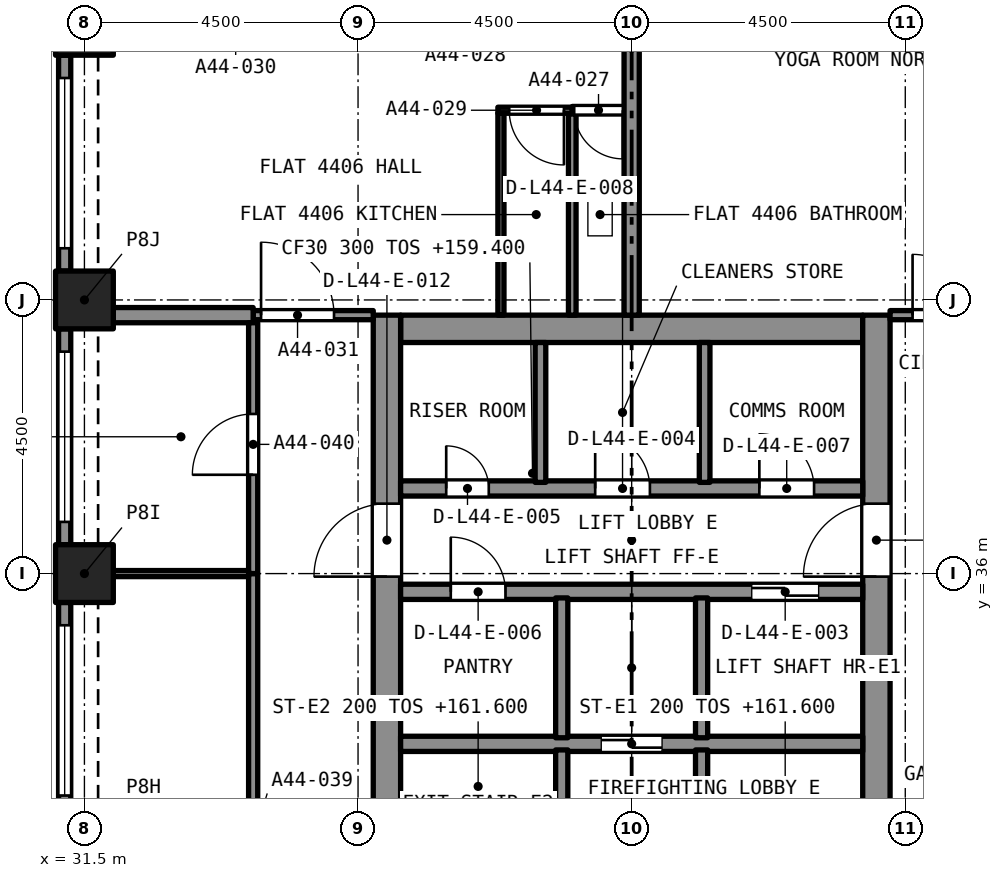
"""IFC4 building model, lengths in metres.
Left out: names, types, materials, properties, quantities, classifications, styles, units other than length and angle.
Written with IfcOpenShell. Run it as: python <this file> out.ifc"""

import sys

from ifc_helpers import new_model, si_unit, direction, frame, frame_2d, origin, origin_2d, place, context, subcontext, project, spatial, rectangle, extrude, element, fill, save


model = new_model("IFC4")
c1 = context("Model", 3, precision=1e-05, world=origin(), true_north=direction((0.0, 1.0)))
c2 = subcontext(c1, "Body", "Model", "MODEL_VIEW")
j1 = project(units=[si_unit("LENGTHUNIT", "METRE"), si_unit("PLANEANGLEUNIT", "RADIAN")], contexts=[c1])
p1 = place(None, origin())
s1 = spatial("IfcSite", under=j1, at=p1, CompositionType="ELEMENT")
p2 = place(p1, origin())
s2 = spatial("IfcBuilding", under=s1, at=p2, CompositionType="ELEMENT")
p3 = place(p2, frame((0.0, 0.0, 159.4)))
s3 = spatial("IfcBuildingStorey", under=s2, at=p3, CompositionType="ELEMENT", Elevation=159.4)
for number, where, z_axis, x_axis in (
    (1, (31.5, 36.0, 0.0), (0.0, 0.0, 1.0), (1.0, 0.0, 0.0)),
    (2, (31.5, 40.5, 0.0), (0.0, 0.0, 1.0), (1.0, 0.0, 0.0)),
    (3, (31.5, 45.0, 0.0), (0.0, 0.0, 1.0), (1.0, 0.0, 0.0)),
):
    element("IfcColumn", number, at=place(p3, frame(where, z_axis=z_axis, x_axis=x_axis)), inside=s3, PredefinedType="COLUMN", context=c2, shape_type="SweptSolid", body=[
        extrude(rectangle(XDim=0.95, YDim=0.95, at=origin_2d()), origin(), (0.0, 0.0, 1.0), 4.4),
    ])
p4 = place(p3, frame((36.7, 40.025, 0.0), z_axis=(0.0, 0.0, 1.0), x_axis=(1.0, 0.0, 0.0)))
e4 = element("IfcWall", 4, at=p4, inside=s3, PredefinedType="SOLIDWALL", context=c2, shape_type="SweptSolid", body=[
    extrude(rectangle(XDim=7.6, YDim=0.45, at=frame_2d((3.8, 0.0))), origin(), (0.0, 0.0, 1.0), 4.4),
])
p5 = place(p3, frame((36.475, 27.25, 0.0), z_axis=(0.0, 0.0, 1.0), x_axis=(0.0, 1.0, 0.0)))
e5 = element("IfcWall", 5, at=p5, inside=s3, PredefinedType="SOLIDWALL", context=c2, shape_type="SweptSolid", body=[
    extrude(rectangle(XDim=13.0, YDim=0.45, at=frame_2d((6.5, 0.0))), origin(), (0.0, 0.0, 1.0), 4.4),
])
p6 = place(p5, frame((8.7, 0.0, 0.0)))
e6 = element("IfcOpeningElement", 6, at=p6, cuts=e5, PredefinedType="OPENING", context=c2, shape_type="SweptSolid", body=[
    extrude(rectangle(XDim=1.2, YDim=2.1, at=frame_2d((0.6, 1.05))), frame((0.0, 0.235, 0.0), z_axis=(0.0, -1.0, 0.0), x_axis=(1.0, 0.0, 0.0)), (0.0, 0.0, 1.0), 0.47),
])
p7 = place(p3, frame((44.525, 27.25, 0.0), z_axis=(0.0, 0.0, 1.0), x_axis=(0.0, 1.0, 0.0)))
e7 = element("IfcWall", 7, at=p7, inside=s3, PredefinedType="SOLIDWALL", context=c2, shape_type="SweptSolid", body=[
    extrude(rectangle(XDim=13.0, YDim=0.45, at=frame_2d((6.5, 0.0))), origin(), (0.0, 0.0, 1.0), 4.4),
])
p8 = place(p7, frame((8.7, 0.0, 0.0)))
e8 = element("IfcOpeningElement", 8, at=p8, cuts=e7, PredefinedType="OPENING", context=c2, shape_type="SweptSolid", body=[
    extrude(rectangle(XDim=1.2, YDim=2.1, at=frame_2d((0.6, 1.05))), frame((0.0, 0.235, 0.0), z_axis=(0.0, -1.0, 0.0), x_axis=(1.0, 0.0, 0.0)), (0.0, 0.0, 1.0), 0.47),
])
p9 = place(p3, frame((31.175, 40.975, 0.0), z_axis=(0.0, 0.0, 1.0), x_axis=(0.0, 1.0, 0.0)))
e9 = element("IfcWall", 9, at=p9, inside=s3, PredefinedType="SOLIDWALL", context=c2, shape_type="SweptSolid", body=[
    extrude(rectangle(XDim=3.55, YDim=0.2, at=frame_2d((1.775, 0.0))), origin(), (0.0, 0.0, 1.0), 4.4),
])
p10 = place(p9, frame((0.375, 0.0, 0.45)))
e10 = element("IfcOpeningElement", 10, at=p10, cuts=e9, PredefinedType="OPENING", context=c2, shape_type="SweptSolid", body=[
    extrude(rectangle(XDim=2.8, YDim=2.55, at=frame_2d((1.4, 1.275))), frame((0.0, 0.11, 0.0), z_axis=(0.0, -1.0, 0.0), x_axis=(1.0, 0.0, 0.0)), (0.0, 0.0, 1.0), 0.22),
])
p11 = place(p3, frame((31.175, 36.475, 0.0), z_axis=(0.0, 0.0, 1.0), x_axis=(0.0, 1.0, 0.0)))
e11 = element("IfcWall", 11, at=p11, inside=s3, PredefinedType="SOLIDWALL", context=c2, shape_type="SweptSolid", body=[
    extrude(rectangle(XDim=3.55, YDim=0.2, at=frame_2d((1.775, 0.0))), origin(), (0.0, 0.0, 1.0), 4.4),
])
p12 = place(p11, frame((0.375, 0.0, 0.45)))
e12 = element("IfcOpeningElement", 12, at=p12, cuts=e11, PredefinedType="OPENING", context=c2, shape_type="SweptSolid", body=[
    extrude(rectangle(XDim=2.8, YDim=2.55, at=frame_2d((1.4, 1.275))), frame((0.0, 0.11, 0.0), z_axis=(0.0, -1.0, 0.0), x_axis=(1.0, 0.0, 0.0)), (0.0, 0.0, 1.0), 0.22),
])
p13 = place(p3, frame((31.175, 31.975, 0.0), z_axis=(0.0, 0.0, 1.0), x_axis=(0.0, 1.0, 0.0)))
e13 = element("IfcWall", 13, at=p13, inside=s3, PredefinedType="SOLIDWALL", context=c2, shape_type="SweptSolid", body=[
    extrude(rectangle(XDim=3.55, YDim=0.2, at=frame_2d((1.775, 0.0))), origin(), (0.0, 0.0, 1.0), 4.4),
])
p14 = place(p13, frame((0.375, 0.0, 0.45)))
e14 = element("IfcOpeningElement", 14, at=p14, cuts=e13, PredefinedType="OPENING", context=c2, shape_type="SweptSolid", body=[
    extrude(rectangle(XDim=2.8, YDim=2.55, at=frame_2d((1.4, 1.275))), frame((0.0, 0.11, 0.0), z_axis=(0.0, -1.0, 0.0), x_axis=(1.0, 0.0, 0.0)), (0.0, 0.0, 1.0), 0.22),
])
p15 = place(p3, frame((40.375, 43.62, 0.0), z_axis=(0.0, 0.0, 1.0), x_axis=(-1.0, 0.0, 0.0)))
e15 = element("IfcWall", 15, at=p15, inside=s3, PredefinedType="PARTITIONING", context=c2, shape_type="SweptSolid", body=[
    extrude(rectangle(XDim=0.852, YDim=0.125, at=frame_2d((0.426, 0.0))), origin(), (0.0, 0.0, 1.0), 4.1),
])
p16 = place(p15, frame((0.02, 0.0, 0.0)))
e16 = element("IfcOpeningElement", 16, at=p16, cuts=e15, PredefinedType="OPENING", context=c2, shape_type="SweptSolid", body=[
    extrude(rectangle(XDim=0.8, YDim=2.1, at=frame_2d((0.4, 1.05))), frame((0.0, 0.073, 0.0), z_axis=(0.0, -1.0, 0.0), x_axis=(1.0, 0.0, 0.0)), (0.0, 0.0, 1.0), 0.145),
])
p17 = place(p3, frame((39.523, 40.25, 0.0), z_axis=(0.0, 0.0, 1.0), x_axis=(0.0, 1.0, 0.0)))
e17 = element("IfcWall", 17, at=p17, inside=s3, PredefinedType="PARTITIONING", context=c2, shape_type="SweptSolid", body=[
    extrude(rectangle(XDim=3.308, YDim=0.125, at=frame_2d((1.654, 0.0))), origin(), (0.0, 0.0, 1.0), 4.1),
])
p18 = place(p3, frame((40.5, 40.25, 0.0), z_axis=(0.0, 0.0, 1.0), x_axis=(0.0, 1.0, 0.0)))
e18 = element("IfcWall", 18, at=p18, inside=s3, PredefinedType="PARTITIONING", context=c2, shape_type="SweptSolid", body=[
    extrude(rectangle(XDim=8.775, YDim=0.25, at=frame_2d((4.387, 0.0))), origin(), (0.0, 0.0, 1.0), 4.1),
])
p19 = place(p3, frame((39.523, 43.62, 0.0), z_axis=(0.0, 0.0, 1.0), x_axis=(-1.0, 0.0, 0.0)))
e19 = element("IfcWall", 19, at=p19, inside=s3, PredefinedType="PARTITIONING", context=c2, shape_type="SweptSolid", body=[
    extrude(rectangle(XDim=1.223, YDim=0.1, at=frame_2d((0.611, 0.0))), origin(), (0.0, 0.0, 1.0), 4.1),
])
p20 = place(p19, frame((0.136, 0.0, 0.0)))
e20 = element("IfcOpeningElement", 20, at=p20, cuts=e19, PredefinedType="OPENING", context=c2, shape_type="SweptSolid", body=[
    extrude(rectangle(XDim=0.9, YDim=2.1, at=frame_2d((0.45, 1.05))), frame((0.0, 0.06, 0.0), z_axis=(0.0, -1.0, 0.0), x_axis=(1.0, 0.0, 0.0)), (0.0, 0.0, 1.0), 0.12),
])
p21 = place(p3, frame((38.35, 40.25, 0.0), z_axis=(0.0, 0.0, 1.0), x_axis=(0.0, 1.0, 0.0)))
e21 = element("IfcWall", 21, at=p21, inside=s3, PredefinedType="PARTITIONING", context=c2, shape_type="SweptSolid", body=[
    extrude(rectangle(XDim=3.32, YDim=0.1, at=frame_2d((1.66, 0.0))), origin(), (0.0, 0.0, 1.0), 4.1),
])
p22 = place(p3, frame((34.275, 40.25, 0.0), z_axis=(0.0, 0.0, 1.0), x_axis=(1.0, 0.0, 0.0)))
e22 = element("IfcWall", 22, at=p22, inside=s3, PredefinedType="PARTITIONING", context=c2, shape_type="SweptSolid", body=[
    extrude(rectangle(XDim=1.975, YDim=0.15, at=frame_2d((0.988, 0.0))), origin(), (0.0, 0.0, 1.0), 4.1),
])
p23 = place(p22, frame((0.13, 0.0, 0.0)))
e23 = element("IfcOpeningElement", 23, at=p23, cuts=e22, PredefinedType="OPENING", context=c2, shape_type="SweptSolid", body=[
    extrude(rectangle(XDim=1.2, YDim=2.4, at=frame_2d((0.6, 1.2))), frame((0.0, 0.085, 0.0), z_axis=(0.0, -1.0, 0.0), x_axis=(1.0, 0.0, 0.0)), (0.0, 0.0, 1.0), 0.17),
])
p24 = place(p3, frame((31.975, 40.25, 0.0), z_axis=(0.0, 0.0, 1.0), x_axis=(1.0, 0.0, 0.0)))
e24 = element("IfcWall", 24, at=p24, inside=s3, PredefinedType="PARTITIONING", context=c2, shape_type="SweptSolid", body=[
    extrude(rectangle(XDim=2.3, YDim=0.25, at=frame_2d((1.15, 0.0))), origin(), (0.0, 0.0, 1.0), 4.1),
])
p25 = place(p3, frame((44.75, 40.25, 0.0), z_axis=(0.0, 0.0, 1.0), x_axis=(1.0, 0.0, 0.0)))
e25 = element("IfcWall", 25, at=p25, inside=s3, PredefinedType="PARTITIONING", context=c2, shape_type="SweptSolid", body=[
    extrude(rectangle(XDim=1.5, YDim=0.15, at=frame_2d((0.75, 0.0))), origin(), (0.0, 0.0, 1.0), 4.1),
])
p26 = place(p25, frame((0.37, 0.0, 0.0)))
e26 = element("IfcOpeningElement", 26, at=p26, cuts=e25, PredefinedType="OPENING", context=c2, shape_type="SweptSolid", body=[
    extrude(rectangle(XDim=1.0, YDim=2.1, at=frame_2d((0.5, 1.05))), frame((0.0, 0.085, 0.0), z_axis=(0.0, -1.0, 0.0), x_axis=(1.0, 0.0, 0.0)), (0.0, 0.0, 1.0), 0.17),
])
p27 = place(p3, frame((34.275, 27.175, 0.0), z_axis=(0.0, 0.0, 1.0), x_axis=(0.0, 1.0, 0.0)))
e27 = element("IfcWall", 27, at=p27, inside=s3, PredefinedType="PARTITIONING", context=c2, shape_type="SweptSolid", body=[
    extrude(rectangle(XDim=8.825, YDim=0.15, at=frame_2d((4.413, 0.0))), origin(), (0.0, 0.0, 1.0), 4.1),
])
p28 = place(p27, frame((3.95, 0.0, 0.0)))
e28 = element("IfcOpeningElement", 28, at=p28, cuts=e27, PredefinedType="OPENING", context=c2, shape_type="SweptSolid", body=[
    extrude(rectangle(XDim=1.0, YDim=2.1, at=frame_2d((0.5, 1.05))), frame((0.0, 0.085, 0.0), z_axis=(0.0, -1.0, 0.0), x_axis=(1.0, 0.0, 0.0)), (0.0, 0.0, 1.0), 0.17),
])
p29 = place(p3, frame((34.275, 36.0, 0.0), z_axis=(0.0, 0.0, 1.0), x_axis=(0.0, 1.0, 0.0)))
e29 = element("IfcWall", 29, at=p29, inside=s3, PredefinedType="PARTITIONING", context=c2, shape_type="SweptSolid", body=[
    extrude(rectangle(XDim=4.125, YDim=0.15, at=frame_2d((2.062, 0.0))), origin(), (0.0, 0.0, 1.0), 4.1),
])
p30 = place(p29, frame((1.625, 0.0, 0.0)))
e30 = element("IfcOpeningElement", 30, at=p30, cuts=e29, PredefinedType="OPENING", context=c2, shape_type="SweptSolid", body=[
    extrude(rectangle(XDim=1.0, YDim=2.1, at=frame_2d((0.5, 1.05))), frame((0.0, 0.085, 0.0), z_axis=(0.0, -1.0, 0.0), x_axis=(1.0, 0.0, 0.0)), (0.0, 0.0, 1.0), 0.17),
])
p31 = place(p3, frame((31.975, 36.0, 0.0), z_axis=(0.0, 0.0, 1.0), x_axis=(1.0, 0.0, 0.0)))
e31 = element("IfcWall", 31, at=p31, inside=s3, PredefinedType="PARTITIONING", context=c2, shape_type="SweptSolid", body=[
    extrude(rectangle(XDim=2.225, YDim=0.1, at=frame_2d((1.112, 0.0))), origin(), (0.0, 0.0, 1.0), 4.1),
])
p32 = place(p3, frame((36.7, 33.2, 0.0), z_axis=(0.0, 0.0, 1.0), x_axis=(1.0, 0.0, 0.0)))
e32 = element("IfcWall", 32, at=p32, inside=s3, PredefinedType="SOLIDWALL", context=c2, shape_type="SweptSolid", body=[
    extrude(rectangle(XDim=7.6, YDim=0.25, at=frame_2d((3.8, 0.0))), origin(), (0.0, 0.0, 1.0), 4.1),
])
p33 = place(p32, frame((3.3, 0.0, 0.0)))
e33 = element("IfcOpeningElement", 33, at=p33, cuts=e32, PredefinedType="OPENING", context=c2, shape_type="SweptSolid", body=[
    extrude(rectangle(XDim=1.0, YDim=2.1, at=frame_2d((0.5, 1.05))), frame((0.0, 0.135, 0.0), z_axis=(0.0, -1.0, 0.0), x_axis=(1.0, 0.0, 0.0)), (0.0, 0.0, 1.0), 0.27),
])
p34 = place(p3, frame((36.7, 35.7, 0.0), z_axis=(0.0, 0.0, 1.0), x_axis=(1.0, 0.0, 0.0)))
e34 = element("IfcWall", 34, at=p34, inside=s3, PredefinedType="SOLIDWALL", context=c2, shape_type="SweptSolid", body=[
    extrude(rectangle(XDim=7.6, YDim=0.25, at=frame_2d((3.8, 0.0))), origin(), (0.0, 0.0, 1.0), 4.1),
])
p35 = place(p34, frame((5.775, 0.0, 0.0)))
e35 = element("IfcOpeningElement", 35, at=p35, cuts=e34, PredefinedType="OPENING", context=c2, shape_type="SweptSolid", body=[
    extrude(rectangle(XDim=1.1, YDim=2.4, at=frame_2d((0.55, 1.2))), frame((0.0, 0.135, 0.0), z_axis=(0.0, -1.0, 0.0), x_axis=(1.0, 0.0, 0.0)), (0.0, 0.0, 1.0), 0.27),
])
p36 = place(p34, frame((0.825, 0.0, 0.0)))
e36 = element("IfcOpeningElement", 36, at=p36, cuts=e34, PredefinedType="OPENING", context=c2, shape_type="SweptSolid", body=[
    extrude(rectangle(XDim=0.9, YDim=2.1, at=frame_2d((0.45, 1.05))), frame((0.0, 0.135, 0.0), z_axis=(0.0, -1.0, 0.0), x_axis=(1.0, 0.0, 0.0)), (0.0, 0.0, 1.0), 0.27),
])
p37 = place(p3, frame((36.7, 37.4, 0.0), z_axis=(0.0, 0.0, 1.0), x_axis=(1.0, 0.0, 0.0)))
e37 = element("IfcWall", 37, at=p37, inside=s3, PredefinedType="SOLIDWALL", context=c2, shape_type="SweptSolid", body=[
    extrude(rectangle(XDim=7.6, YDim=0.25, at=frame_2d((3.8, 0.0))), origin(), (0.0, 0.0, 1.0), 4.1),
])
p38 = place(p37, frame((0.75, 0.0, 0.0)))
e38 = element("IfcOpeningElement", 38, at=p38, cuts=e37, PredefinedType="OPENING", context=c2, shape_type="SweptSolid", body=[
    extrude(rectangle(XDim=0.7, YDim=2.1, at=frame_2d((0.35, 1.05))), frame((0.0, 0.135, 0.0), z_axis=(0.0, -1.0, 0.0), x_axis=(1.0, 0.0, 0.0)), (0.0, 0.0, 1.0), 0.27),
])
p39 = place(p37, frame((5.9, 0.0, 0.0)))
e39 = element("IfcOpeningElement", 39, at=p39, cuts=e37, PredefinedType="OPENING", context=c2, shape_type="SweptSolid", body=[
    extrude(rectangle(XDim=0.9, YDim=2.1, at=frame_2d((0.45, 1.05))), frame((0.0, 0.135, 0.0), z_axis=(0.0, -1.0, 0.0), x_axis=(1.0, 0.0, 0.0)), (0.0, 0.0, 1.0), 0.27),
])
p40 = place(p37, frame((3.2, 0.0, 0.0)))
e40 = element("IfcOpeningElement", 40, at=p40, cuts=e37, PredefinedType="OPENING", context=c2, shape_type="SweptSolid", body=[
    extrude(rectangle(XDim=0.9, YDim=2.1, at=frame_2d((0.45, 1.05))), frame((0.0, 0.135, 0.0), z_axis=(0.0, -1.0, 0.0), x_axis=(1.0, 0.0, 0.0)), (0.0, 0.0, 1.0), 0.27),
])
p41 = place(p3, frame((41.65, 27.7, 0.0), z_axis=(0.0, 0.0, 1.0), x_axis=(0.0, 1.0, 0.0)))
e41 = element("IfcWall", 41, at=p41, inside=s3, PredefinedType="SOLIDWALL", context=c2, shape_type="SweptSolid", body=[
    extrude(rectangle(XDim=5.4, YDim=0.2, at=frame_2d((2.7, 0.0))), origin(), (0.0, 0.0, 1.0), 4.1),
])
p42 = place(p41, frame((0.2, 0.0, 0.0)))
e42 = element("IfcOpeningElement", 42, at=p42, cuts=e41, PredefinedType="OPENING", context=c2, shape_type="SweptSolid", body=[
    extrude(rectangle(XDim=0.9, YDim=2.1, at=frame_2d((0.45, 1.05))), frame((0.0, 0.11, 0.0), z_axis=(0.0, -1.0, 0.0), x_axis=(1.0, 0.0, 0.0)), (0.0, 0.0, 1.0), 0.22),
])
p43 = place(p3, frame((39.35, 27.7, 0.0), z_axis=(0.0, 0.0, 1.0), x_axis=(0.0, 1.0, 0.0)))
e43 = element("IfcWall", 43, at=p43, inside=s3, PredefinedType="SOLIDWALL", context=c2, shape_type="SweptSolid", body=[
    extrude(rectangle(XDim=5.4, YDim=0.2, at=frame_2d((2.7, 0.0))), origin(), (0.0, 0.0, 1.0), 4.1),
])
p44 = place(p43, frame((0.2, 0.0, 0.0)))
e44 = element("IfcOpeningElement", 44, at=p44, cuts=e43, PredefinedType="OPENING", context=c2, shape_type="SweptSolid", body=[
    extrude(rectangle(XDim=0.9, YDim=2.1, at=frame_2d((0.45, 1.05))), frame((0.0, 0.11, 0.0), z_axis=(0.0, -1.0, 0.0), x_axis=(1.0, 0.0, 0.0)), (0.0, 0.0, 1.0), 0.22),
])
for number, where, z_axis, x_axis in (
    (45, (41.65, 33.3, 0.0), (0.0, 0.0, 1.0), (0.0, 1.0, 0.0)),
    (46, (39.35, 33.3, 0.0), (0.0, 0.0, 1.0), (0.0, 1.0, 0.0)),
):
    element("IfcWall", number, at=place(p3, frame(where, z_axis=z_axis, x_axis=x_axis)), inside=s3, PredefinedType="SOLIDWALL", context=c2, shape_type="SweptSolid", body=[
        extrude(rectangle(XDim=2.3, YDim=0.2, at=frame_2d((1.15, 0.0))), origin(), (0.0, 0.0, 1.0), 4.1),
    ])
for number, where, z_axis, x_axis in (
    (47, (41.7, 37.5, 0.0), (0.0, 0.0, 1.0), (0.0, 1.0, 0.0)),
    (48, (39.0, 37.5, 0.0), (0.0, 0.0, 1.0), (0.0, 1.0, 0.0)),
):
    element("IfcWall", number, at=place(p3, frame(where, z_axis=z_axis, x_axis=x_axis)), inside=s3, PredefinedType="SOLIDWALL", context=c2, shape_type="SweptSolid", body=[
        extrude(rectangle(XDim=2.3, YDim=0.175, at=frame_2d((1.15, 0.0))), origin(), (0.0, 0.0, 1.0), 4.1),
    ])
p45 = place(p10, origin())
e49 = element("IfcWindow", 49, at=p45, inside=s3, PartitioningType="SINGLE_PANEL", PredefinedType="WINDOW", context=c2, shape_type="SweptSolid", body=[
    extrude(rectangle(XDim=2.8, YDim=2.55, at=frame_2d((1.4, 1.275))), frame((0.0, 0.03, 0.0), z_axis=(0.0, -1.0, 0.0), x_axis=(1.0, 0.0, 0.0)), (0.0, 0.0, 1.0), 0.06),
])
fill(e10, e49)
p46 = place(p12, origin())
e50 = element("IfcWindow", 50, at=p46, inside=s3, PartitioningType="SINGLE_PANEL", PredefinedType="WINDOW", context=c2, shape_type="SweptSolid", body=[
    extrude(rectangle(XDim=2.8, YDim=2.55, at=frame_2d((1.4, 1.275))), frame((0.0, 0.03, 0.0), z_axis=(0.0, -1.0, 0.0), x_axis=(1.0, 0.0, 0.0)), (0.0, 0.0, 1.0), 0.06),
])
fill(e12, e50)
p47 = place(p14, origin())
e51 = element("IfcWindow", 51, at=p47, inside=s3, PartitioningType="SINGLE_PANEL", PredefinedType="WINDOW", context=c2, shape_type="SweptSolid", body=[
    extrude(rectangle(XDim=2.8, YDim=2.55, at=frame_2d((1.4, 1.275))), frame((0.0, 0.03, 0.0), z_axis=(0.0, -1.0, 0.0), x_axis=(1.0, 0.0, 0.0)), (0.0, 0.0, 1.0), 0.06),
])
fill(e14, e51)
p48 = place(p16, origin())
e52 = element("IfcDoor", 52, at=p48, inside=s3, OperationType="SINGLE_SWING_LEFT", PredefinedType="DOOR", context=c2, shape_type="SweptSolid", body=[
    extrude(rectangle(XDim=0.8, YDim=2.1, at=frame_2d((0.4, 1.05))), frame((0.0, 0.025, 0.0), z_axis=(0.0, -1.0, 0.0), x_axis=(1.0, 0.0, 0.0)), (0.0, 0.0, 1.0), 0.05),
])
fill(e16, e52)
p49 = place(p20, origin())
e53 = element("IfcDoor", 53, at=p49, inside=s3, OperationType="SINGLE_SWING_LEFT", PredefinedType="DOOR", context=c2, shape_type="SweptSolid", body=[
    extrude(rectangle(XDim=0.9, YDim=2.1, at=frame_2d((0.45, 1.05))), frame((0.0, 0.025, 0.0), z_axis=(0.0, -1.0, 0.0), x_axis=(1.0, 0.0, 0.0)), (0.0, 0.0, 1.0), 0.05),
])
fill(e20, e53)
p50 = place(p23, origin())
e54 = element("IfcDoor", 54, at=p50, inside=s3, OperationType="SINGLE_SWING_LEFT", PredefinedType="DOOR", context=c2, shape_type="SweptSolid", body=[
    extrude(rectangle(XDim=1.2, YDim=2.4, at=frame_2d((0.6, 1.2))), frame((0.0, 0.025, 0.0), z_axis=(0.0, -1.0, 0.0), x_axis=(1.0, 0.0, 0.0)), (0.0, 0.0, 1.0), 0.05),
])
fill(e23, e54)
p51 = place(p26, origin())
e55 = element("IfcDoor", 55, at=p51, inside=s3, OperationType="SINGLE_SWING_RIGHT", PredefinedType="DOOR", context=c2, shape_type="SweptSolid", body=[
    extrude(rectangle(XDim=1.0, YDim=2.1, at=frame_2d((0.5, 1.05))), frame((0.0, 0.025, 0.0), z_axis=(0.0, -1.0, 0.0), x_axis=(1.0, 0.0, 0.0)), (0.0, 0.0, 1.0), 0.05),
])
fill(e26, e55)
p52 = place(p30, origin())
e56 = element("IfcDoor", 56, at=p52, inside=s3, OperationType="SINGLE_SWING_RIGHT", PredefinedType="DOOR", context=c2, shape_type="SweptSolid", body=[
    extrude(rectangle(XDim=1.0, YDim=2.1, at=frame_2d((0.5, 1.05))), frame((0.0, 0.025, 0.0), z_axis=(0.0, -1.0, 0.0), x_axis=(1.0, 0.0, 0.0)), (0.0, 0.0, 1.0), 0.05),
])
fill(e30, e56)
p53 = place(p35, origin())
e57 = element("IfcDoor", 57, at=p53, inside=s3, OperationType="SLIDING_TO_LEFT", PredefinedType="DOOR", context=c2, shape_type="SweptSolid", body=[
    extrude(rectangle(XDim=1.1, YDim=2.4, at=frame_2d((0.55, 1.2))), frame((0.0, 0.025, 0.0), z_axis=(0.0, -1.0, 0.0), x_axis=(1.0, 0.0, 0.0)), (0.0, 0.0, 1.0), 0.05),
])
fill(e35, e57)
p54 = place(p33, origin())
e58 = element("IfcDoor", 58, at=p54, inside=s3, OperationType="SLIDING_TO_LEFT", PredefinedType="DOOR", context=c2, shape_type="SweptSolid", body=[
    extrude(rectangle(XDim=1.0, YDim=2.1, at=frame_2d((0.5, 1.05))), frame((0.0, 0.025, 0.0), z_axis=(0.0, -1.0, 0.0), x_axis=(1.0, 0.0, 0.0)), (0.0, 0.0, 1.0), 0.05),
])
fill(e33, e58)
p55 = place(p38, origin())
e59 = element("IfcDoor", 59, at=p55, inside=s3, OperationType="SINGLE_SWING_LEFT", PredefinedType="DOOR", context=c2, shape_type="SweptSolid", body=[
    extrude(rectangle(XDim=0.7, YDim=2.1, at=frame_2d((0.35, 1.05))), frame((0.0, 0.025, 0.0), z_axis=(0.0, -1.0, 0.0), x_axis=(1.0, 0.0, 0.0)), (0.0, 0.0, 1.0), 0.05),
])
fill(e38, e59)
p56 = place(p36, origin())
e60 = element("IfcDoor", 60, at=p56, inside=s3, OperationType="SINGLE_SWING_LEFT", PredefinedType="DOOR", context=c2, shape_type="SweptSolid", body=[
    extrude(rectangle(XDim=0.9, YDim=2.1, at=frame_2d((0.45, 1.05))), frame((0.0, 0.025, 0.0), z_axis=(0.0, -1.0, 0.0), x_axis=(1.0, 0.0, 0.0)), (0.0, 0.0, 1.0), 0.05),
])
fill(e36, e60)
p57 = place(p39, origin())
e61 = element("IfcDoor", 61, at=p57, inside=s3, OperationType="SINGLE_SWING_LEFT", PredefinedType="DOOR", context=c2, shape_type="SweptSolid", body=[
    extrude(rectangle(XDim=0.9, YDim=2.1, at=frame_2d((0.45, 1.05))), frame((0.0, 0.025, 0.0), z_axis=(0.0, -1.0, 0.0), x_axis=(1.0, 0.0, 0.0)), (0.0, 0.0, 1.0), 0.05),
])
fill(e39, e61)
p58 = place(p40, origin())
e62 = element("IfcDoor", 62, at=p58, inside=s3, OperationType="SINGLE_SWING_LEFT", PredefinedType="DOOR", context=c2, shape_type="SweptSolid", body=[
    extrude(rectangle(XDim=0.9, YDim=2.1, at=frame_2d((0.45, 1.05))), frame((0.0, 0.025, 0.0), z_axis=(0.0, -1.0, 0.0), x_axis=(1.0, 0.0, 0.0)), (0.0, 0.0, 1.0), 0.05),
])
fill(e40, e62)
p59 = place(p6, origin())
e63 = element("IfcDoor", 63, at=p59, inside=s3, OperationType="SINGLE_SWING_LEFT", PredefinedType="DOOR", context=c2, shape_type="SweptSolid", body=[
    extrude(rectangle(XDim=1.2, YDim=2.1, at=frame_2d((0.6, 1.05))), frame((0.0, 0.025, 0.0), z_axis=(0.0, -1.0, 0.0), x_axis=(1.0, 0.0, 0.0)), (0.0, 0.0, 1.0), 0.05),
])
fill(e6, e63)
p60 = place(p8, origin())
e64 = element("IfcDoor", 64, at=p60, inside=s3, OperationType="SINGLE_SWING_LEFT", PredefinedType="DOOR", context=c2, shape_type="SweptSolid", body=[
    extrude(rectangle(XDim=1.2, YDim=2.1, at=frame_2d((0.6, 1.05))), frame((0.0, 0.025, 0.0), z_axis=(0.0, -1.0, 0.0), x_axis=(1.0, 0.0, 0.0)), (0.0, 0.0, 1.0), 0.05),
])
fill(e8, e64)
save(model, sys.argv[1])
